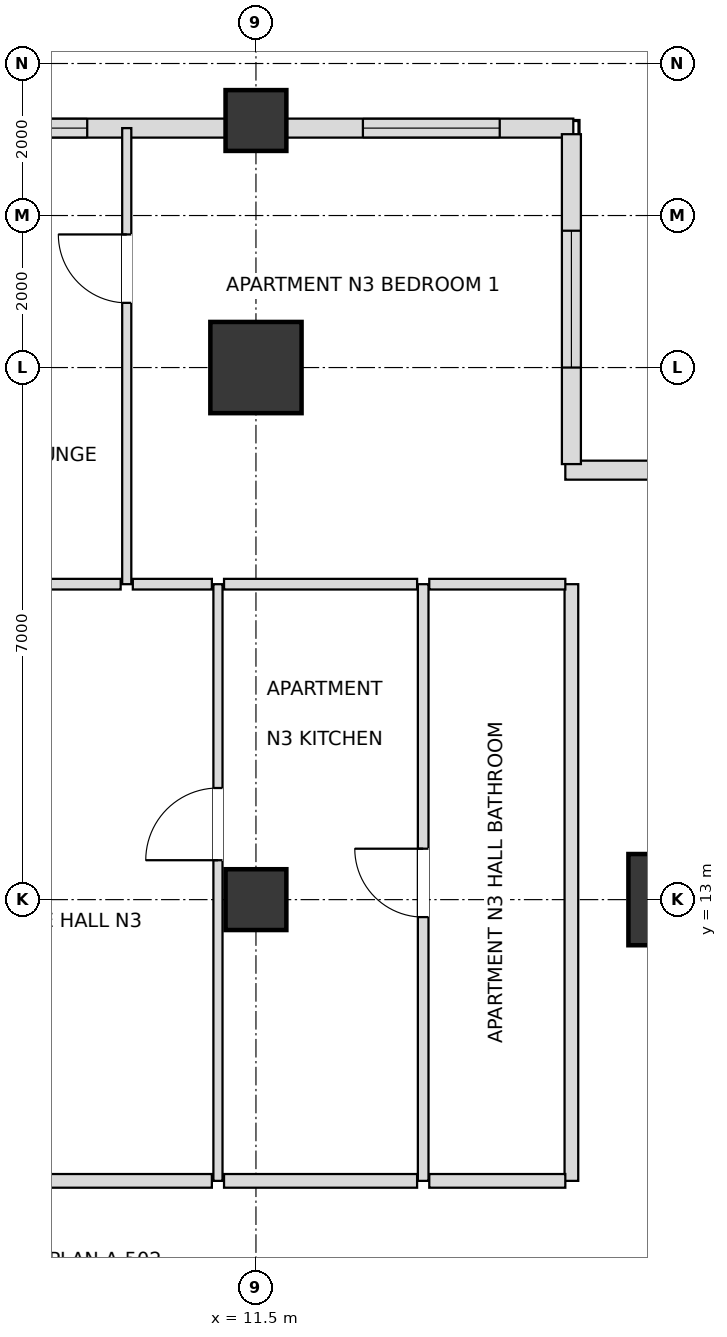
"""IFC4 building model, lengths in metres.
Left out: names, types, materials, properties, quantities, classifications, styles, units other than length and angle.
Written with IfcOpenShell. Run it as: python <this file> out.ifc"""

import sys

from ifc_helpers import new_model, si_unit, direction, frame, frame_2d, origin, origin_2d, place, context, subcontext, project, spatial, rectangle, extrude, element, fill, save


model = new_model("IFC4")
c1 = context("Model", 3, precision=1e-05, world=origin(), true_north=direction((0.0, 1.0)))
c2 = subcontext(c1, "Body", "Model", "MODEL_VIEW")
j1 = project(units=[si_unit("LENGTHUNIT", "METRE"), si_unit("PLANEANGLEUNIT", "RADIAN")], contexts=[c1])
p1 = place(None, origin())
s1 = spatial("IfcSite", under=j1, at=p1, CompositionType="ELEMENT")
p2 = place(p1, origin())
s2 = spatial("IfcBuilding", under=s1, at=p2, CompositionType="ELEMENT")
p3 = place(p2, frame((0.0, 0.0, 113.4)))
s3 = spatial("IfcBuildingStorey", under=s2, at=p3, CompositionType="ELEMENT", Elevation=113.4)
for number, where, z_axis, x_axis in (
    (1, (17.0, 13.0, 0.0), (0.0, 0.0, 1.0), (1.0, 0.0, 0.0)),
    (2, (11.5, 20.0, 0.0), (0.0, 0.0, 1.0), (1.0, 0.0, 0.0)),
):
    element("IfcColumn", number, at=place(p3, frame(where, z_axis=z_axis, x_axis=x_axis)), inside=s3, PredefinedType="USERDEFINED", context=c2, shape_type="SweptSolid", body=[
        extrude(rectangle(XDim=1.2, YDim=1.2, at=origin_2d()), origin(), (0.0, 0.0, 1.0), 3.6),
    ])
for number, where, z_axis, x_axis in (
    (3, (11.5, 13.0, 0.0), (0.0, 0.0, 1.0), (1.0, 0.0, 0.0)),
    (4, (11.5, 23.25, 0.0), (0.0, 0.0, 1.0), (1.0, 0.0, 0.0)),
):
    element("IfcColumn", number, at=place(p3, frame(where, z_axis=z_axis, x_axis=x_axis)), inside=s3, PredefinedType="COLUMN", context=c2, shape_type="SweptSolid", body=[
        extrude(rectangle(XDim=0.8, YDim=0.8, at=origin_2d()), origin(), (0.0, 0.0, 1.0), 3.6),
    ])
p4 = place(p3, frame((15.675, 23.15, 0.0), z_axis=(0.0, 0.0, 1.0), x_axis=(-1.0, 0.0, 0.0)))
e5 = element("IfcWall", 5, at=p4, inside=s3, PredefinedType="SOLIDWALL", context=c2, shape_type="SweptSolid", body=[
    extrude(rectangle(XDim=3.78, YDim=0.25, at=frame_2d((1.89, 0.0))), origin(), (0.0, 0.0, 1.0), 2.736),
])
p5 = place(p4, frame((0.968, 0.0, 0.72)))
e6 = element("IfcOpeningElement", 6, at=p5, cuts=e5, PredefinedType="OPENING", context=c2, shape_type="SweptSolid", body=[
    extrude(rectangle(XDim=1.8, YDim=1.68, at=frame_2d((0.9, 0.84))), frame((0.0, 0.135, 0.0), z_axis=(0.0, -1.0, 0.0), x_axis=(1.0, 0.0, 0.0)), (0.0, 0.0, 1.0), 0.27),
])
p6 = place(p3, frame((11.105, 23.15, 0.0), z_axis=(0.0, 0.0, 1.0), x_axis=(-1.0, 0.0, 0.0)))
e7 = element("IfcWall", 7, at=p6, inside=s3, PredefinedType="SOLIDWALL", context=c2, shape_type="SweptSolid", body=[
    extrude(rectangle(XDim=4.21, YDim=0.25, at=frame_2d((2.105, 0.0))), origin(), (0.0, 0.0, 1.0), 2.736),
])
p7 = place(p6, frame((1.825, 0.0, 0.72)))
e8 = element("IfcOpeningElement", 8, at=p7, cuts=e7, PredefinedType="OPENING", context=c2, shape_type="SweptSolid", body=[
    extrude(rectangle(XDim=1.8, YDim=1.68, at=frame_2d((0.9, 0.84))), frame((0.0, 0.135, 0.0), z_axis=(0.0, -1.0, 0.0), x_axis=(1.0, 0.0, 0.0)), (0.0, 0.0, 1.0), 0.27),
])
p8 = place(p3, frame((20.23, 18.65, 0.0), z_axis=(0.0, 0.0, 1.0), x_axis=(-1.0, 0.0, 0.0)))
e9 = element("IfcWall", 9, at=p8, inside=s3, PredefinedType="SOLIDWALL", context=c2, shape_type="SweptSolid", body=[
    extrude(rectangle(XDim=4.66, YDim=0.25, at=frame_2d((2.33, 0.0))), origin(), (0.0, 0.0, 1.0), 2.736),
])
p9 = place(p8, frame((1.43, 0.0, 0.72)))
e10 = element("IfcOpeningElement", 10, at=p9, cuts=e9, PredefinedType="OPENING", context=c2, shape_type="SweptSolid", body=[
    extrude(rectangle(XDim=1.8, YDim=1.68, at=frame_2d((0.9, 0.84))), frame((0.0, 0.135, 0.0), z_axis=(0.0, -1.0, 0.0), x_axis=(1.0, 0.0, 0.0)), (0.0, 0.0, 1.0), 0.27),
])
p10 = place(p3, frame((15.65, 18.73, 0.0), z_axis=(0.0, 0.0, 1.0), x_axis=(0.0, 1.0, 0.0)))
e11 = element("IfcWall", 11, at=p10, inside=s3, PredefinedType="SOLIDWALL", context=c2, shape_type="SweptSolid", body=[
    extrude(rectangle(XDim=4.34, YDim=0.25, at=frame_2d((2.17, 0.0))), origin(), (0.0, 0.0, 1.0), 2.736),
])
p11 = place(p10, frame((1.27, 0.0, 0.72)))
e12 = element("IfcOpeningElement", 12, at=p11, cuts=e11, PredefinedType="OPENING", context=c2, shape_type="SweptSolid", body=[
    extrude(rectangle(XDim=1.8, YDim=1.68, at=frame_2d((0.9, 0.84))), frame((0.0, 0.135, 0.0), z_axis=(0.0, -1.0, 0.0), x_axis=(1.0, 0.0, 0.0)), (0.0, 0.0, 1.0), 0.27),
])
p12 = place(p3, frame((9.8, 17.15, 0.0), z_axis=(0.0, 0.0, 1.0), x_axis=(0.0, 1.0, 0.0)))
e13 = element("IfcWall", 13, at=p12, inside=s3, PredefinedType="PARTITIONING", context=c2, shape_type="SweptSolid", body=[
    extrude(rectangle(XDim=6.0, YDim=0.12, at=frame_2d((3.0, 0.0))), origin(), (0.0, 0.0, 1.0), 2.816),
])
p13 = place(p12, frame((3.701, 0.0, 0.0)))
e14 = element("IfcOpeningElement", 14, at=p13, cuts=e13, PredefinedType="OPENING", context=c2, shape_type="SweptSolid", body=[
    extrude(rectangle(XDim=0.9, YDim=2.1, at=frame_2d((0.45, 1.05))), frame((0.0, 0.07, 0.0), z_axis=(0.0, -1.0, 0.0), x_axis=(1.0, 0.0, 0.0)), (0.0, 0.0, 1.0), 0.14),
])
p14 = place(p3, frame((11.0, 9.3, 0.0), z_axis=(0.0, 0.0, 1.0), x_axis=(0.0, 1.0, 0.0)))
e15 = element("IfcWall", 15, at=p14, inside=s3, PredefinedType="PARTITIONING", context=c2, shape_type="SweptSolid", body=[
    extrude(rectangle(XDim=7.85, YDim=0.12, at=frame_2d((3.925, 0.0))), origin(), (0.0, 0.0, 1.0), 2.816),
])
p15 = place(p14, frame((4.219, 0.0, 0.0)))
e16 = element("IfcOpeningElement", 16, at=p15, cuts=e15, PredefinedType="OPENING", context=c2, shape_type="SweptSolid", body=[
    extrude(rectangle(XDim=0.95, YDim=2.1, at=frame_2d((0.475, 1.05))), frame((0.0, 0.07, 0.0), z_axis=(0.0, -1.0, 0.0), x_axis=(1.0, 0.0, 0.0)), (0.0, 0.0, 1.0), 0.14),
])
p16 = place(p3, frame((13.7, 9.3, 0.0), z_axis=(0.0, 0.0, 1.0), x_axis=(0.0, 1.0, 0.0)))
e17 = element("IfcWall", 17, at=p16, inside=s3, PredefinedType="PARTITIONING", context=c2, shape_type="SweptSolid", body=[
    extrude(rectangle(XDim=7.85, YDim=0.14, at=frame_2d((3.925, 0.0))), origin(), (0.0, 0.0, 1.0), 2.736),
])
p17 = place(p16, frame((3.47, 0.0, 0.0)))
e18 = element("IfcOpeningElement", 18, at=p17, cuts=e17, PredefinedType="OPENING", context=c2, shape_type="SweptSolid", body=[
    extrude(rectangle(XDim=0.9, YDim=2.1, at=frame_2d((0.45, 1.05))), frame((0.0, 0.08, 0.0), z_axis=(0.0, -1.0, 0.0), x_axis=(1.0, 0.0, 0.0)), (0.0, 0.0, 1.0), 0.16),
])
p18 = place(p3, frame((15.65, 9.3, 0.0), z_axis=(0.0, 0.0, 1.0), x_axis=(0.0, 1.0, 0.0)))
e19 = element("IfcWall", 19, at=p18, inside=s3, PredefinedType="PARTITIONING", context=c2, shape_type="SweptSolid", body=[
    extrude(rectangle(XDim=7.85, YDim=0.18, at=frame_2d((3.925, 0.0))), origin(), (0.0, 0.0, 1.0), 2.736),
])
p19 = place(p3, frame((5.28, 9.3, 0.0), z_axis=(0.0, 0.0, 1.0), x_axis=(1.0, 0.0, 0.0)))
e20 = element("IfcWall", 20, at=p19, inside=s3, PredefinedType="PARTITIONING", context=c2, shape_type="SweptSolid", body=[
    extrude(rectangle(XDim=5.64, YDim=0.18, at=frame_2d((2.82, 0.0))), origin(), (0.0, 0.0, 1.0), 2.816),
])
p20 = place(p19, frame((2.345, 0.0, 0.0)))
e21 = element("IfcOpeningElement", 21, at=p20, cuts=e20, PredefinedType="OPENING", context=c2, shape_type="SweptSolid", body=[
    extrude(rectangle(XDim=0.95, YDim=2.15, at=frame_2d((0.475, 1.075))), frame((0.0, 0.1, 0.0), z_axis=(0.0, -1.0, 0.0), x_axis=(1.0, 0.0, 0.0)), (0.0, 0.0, 1.0), 0.2),
])
p21 = place(p3, frame((11.08, 9.3, 0.0), z_axis=(0.0, 0.0, 1.0), x_axis=(1.0, 0.0, 0.0)))
e22 = element("IfcWall", 22, at=p21, inside=s3, PredefinedType="PARTITIONING", context=c2, shape_type="SweptSolid", body=[
    extrude(rectangle(XDim=2.54, YDim=0.18, at=frame_2d((1.27, 0.0))), origin(), (0.0, 0.0, 1.0), 3.38),
])
p22 = place(p3, frame((13.78, 9.3, 0.0), z_axis=(0.0, 0.0, 1.0), x_axis=(1.0, 0.0, 0.0)))
e23 = element("IfcWall", 23, at=p22, inside=s3, PredefinedType="PARTITIONING", context=c2, shape_type="SweptSolid", body=[
    extrude(rectangle(XDim=1.79, YDim=0.18, at=frame_2d((0.895, 0.0))), origin(), (0.0, 0.0, 1.0), 3.38),
])
p23 = place(p3, frame((5.28, 17.15, 0.0), z_axis=(0.0, 0.0, 1.0), x_axis=(1.0, 0.0, 0.0)))
e24 = element("IfcWall", 24, at=p23, inside=s3, PredefinedType="PARTITIONING", context=c2, shape_type="SweptSolid", body=[
    extrude(rectangle(XDim=4.44, YDim=0.14, at=frame_2d((2.22, 0.0))), origin(), (0.0, 0.0, 1.0), 2.816),
])
p24 = place(p23, frame((1.765, 0.0, 0.0)))
e25 = element("IfcOpeningElement", 25, at=p24, cuts=e24, PredefinedType="OPENING", context=c2, shape_type="SweptSolid", body=[
    extrude(rectangle(XDim=0.95, YDim=2.1, at=frame_2d((0.475, 1.05))), frame((0.0, 0.08, 0.0), z_axis=(0.0, -1.0, 0.0), x_axis=(1.0, 0.0, 0.0)), (0.0, 0.0, 1.0), 0.16),
])
p25 = place(p3, frame((9.88, 17.15, 0.0), z_axis=(0.0, 0.0, 1.0), x_axis=(1.0, 0.0, 0.0)))
e26 = element("IfcWall", 26, at=p25, inside=s3, PredefinedType="PARTITIONING", context=c2, shape_type="SweptSolid", body=[
    extrude(rectangle(XDim=1.04, YDim=0.14, at=frame_2d((0.52, 0.0))), origin(), (0.0, 0.0, 1.0), 3.38),
])
p26 = place(p3, frame((11.08, 17.15, 0.0), z_axis=(0.0, 0.0, 1.0), x_axis=(1.0, 0.0, 0.0)))
e27 = element("IfcWall", 27, at=p26, inside=s3, PredefinedType="PARTITIONING", context=c2, shape_type="SweptSolid", body=[
    extrude(rectangle(XDim=2.54, YDim=0.14, at=frame_2d((1.27, 0.0))), origin(), (0.0, 0.0, 1.0), 2.736),
])
p27 = place(p3, frame((13.78, 17.15, 0.0), z_axis=(0.0, 0.0, 1.0), x_axis=(1.0, 0.0, 0.0)))
e28 = element("IfcWall", 28, at=p27, inside=s3, PredefinedType="PARTITIONING", context=c2, shape_type="SweptSolid", body=[
    extrude(rectangle(XDim=1.79, YDim=0.14, at=frame_2d((0.895, 0.0))), origin(), (0.0, 0.0, 1.0), 2.736),
])
p28 = place(p5, origin())
e29 = element("IfcWindow", 29, at=p28, inside=s3, PartitioningType="SINGLE_PANEL", PredefinedType="WINDOW", context=c2, shape_type="SweptSolid", body=[
    extrude(rectangle(XDim=1.8, YDim=1.68, at=frame_2d((0.9, 0.84))), frame((0.0, 0.03, 0.0), z_axis=(0.0, -1.0, 0.0), x_axis=(1.0, 0.0, 0.0)), (0.0, 0.0, 1.0), 0.06),
])
fill(e6, e29)
p29 = place(p7, origin())
e30 = element("IfcWindow", 30, at=p29, inside=s3, PartitioningType="SINGLE_PANEL", PredefinedType="WINDOW", context=c2, shape_type="SweptSolid", body=[
    extrude(rectangle(XDim=1.8, YDim=1.68, at=frame_2d((0.9, 0.84))), frame((0.0, 0.03, 0.0), z_axis=(0.0, -1.0, 0.0), x_axis=(1.0, 0.0, 0.0)), (0.0, 0.0, 1.0), 0.06),
])
fill(e8, e30)
p30 = place(p11, origin())
e31 = element("IfcWindow", 31, at=p30, inside=s3, PartitioningType="SINGLE_PANEL", PredefinedType="WINDOW", context=c2, shape_type="SweptSolid", body=[
    extrude(rectangle(XDim=1.8, YDim=1.68, at=frame_2d((0.9, 0.84))), frame((0.0, 0.03, 0.0), z_axis=(0.0, -1.0, 0.0), x_axis=(1.0, 0.0, 0.0)), (0.0, 0.0, 1.0), 0.06),
])
fill(e12, e31)
p31 = place(p15, origin())
e32 = element("IfcDoor", 32, at=p31, inside=s3, OperationType="SINGLE_SWING_LEFT", PredefinedType="DOOR", context=c2, shape_type="SweptSolid", body=[
    extrude(rectangle(XDim=0.95, YDim=2.1, at=frame_2d((0.475, 1.05))), frame((0.0, 0.025, 0.0), z_axis=(0.0, -1.0, 0.0), x_axis=(1.0, 0.0, 0.0)), (0.0, 0.0, 1.0), 0.05),
])
fill(e16, e32)
p32 = place(p17, origin())
e33 = element("IfcDoor", 33, at=p32, inside=s3, OperationType="SINGLE_SWING_RIGHT", PredefinedType="DOOR", context=c2, shape_type="SweptSolid", body=[
    extrude(rectangle(XDim=0.9, YDim=2.1, at=frame_2d((0.45, 1.05))), frame((0.0, 0.025, 0.0), z_axis=(0.0, -1.0, 0.0), x_axis=(1.0, 0.0, 0.0)), (0.0, 0.0, 1.0), 0.05),
])
fill(e18, e33)
p33 = place(p13, origin())
e34 = element("IfcDoor", 34, at=p33, inside=s3, OperationType="SINGLE_SWING_RIGHT", PredefinedType="DOOR", context=c2, shape_type="SweptSolid", body=[
    extrude(rectangle(XDim=0.9, YDim=2.1, at=frame_2d((0.45, 1.05))), frame((0.0, 0.025, 0.0), z_axis=(0.0, -1.0, 0.0), x_axis=(1.0, 0.0, 0.0)), (0.0, 0.0, 1.0), 0.05),
])
fill(e14, e34)
save(model, sys.argv[1])
